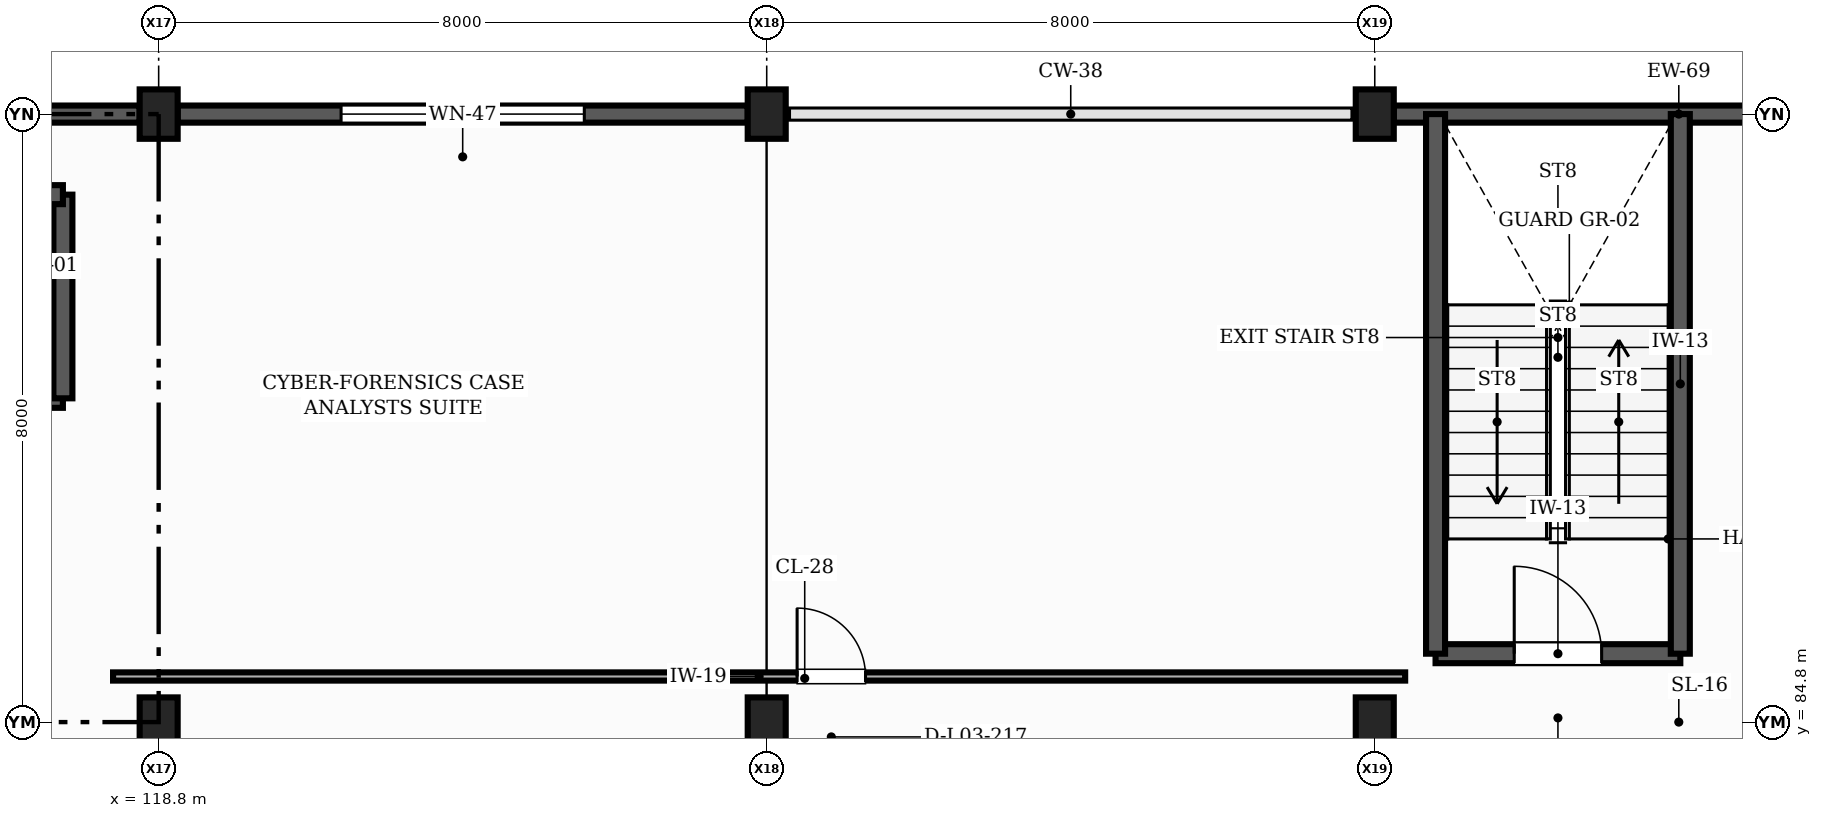
"""IFC4 building model, lengths in metres.
Left out: names, types, materials, properties, quantities, classifications, styles, units other than length and angle.
Written with IfcOpenShell. Run it as: python <this file> out.ifc"""

import sys

from ifc_helpers import new_model, si_unit, direction, frame, frame_2d, origin, origin_2d, place, context, subcontext, project, spatial, rectangle, extrude, element, fill, save


model = new_model("IFC4")
c1 = context("Model", 3, precision=1e-05, world=origin(), true_north=direction((0.0, 1.0)))
c2 = subcontext(c1, "Body", "Model", "MODEL_VIEW")
j1 = project(units=[si_unit("LENGTHUNIT", "METRE"), si_unit("PLANEANGLEUNIT", "RADIAN")], contexts=[c1])
p1 = place(None, origin())
s1 = spatial("IfcSite", under=j1, at=p1, CompositionType="ELEMENT")
p2 = place(p1, origin())
s2 = spatial("IfcBuilding", under=s1, at=p2, CompositionType="ELEMENT")
p3 = place(p2, frame((0.0, 0.0, 13.5)))
s3 = spatial("IfcBuildingStorey", under=s2, at=p3, CompositionType="ELEMENT", Elevation=13.5)
for number, where, z_axis, x_axis in (
    (1, (118.8, 84.8, 0.0), (0.0, 0.0, 1.0), (1.0, 0.0, 0.0)),
    (2, (118.8, 92.8, 0.0), (0.0, 0.0, 1.0), (1.0, 0.0, 0.0)),
    (3, (126.8, 84.8, 0.0), (0.0, 0.0, 1.0), (1.0, 0.0, 0.0)),
    (4, (126.8, 92.8, 0.0), (0.0, 0.0, 1.0), (1.0, 0.0, 0.0)),
    (5, (134.8, 84.8, 0.0), (0.0, 0.0, 1.0), (1.0, 0.0, 0.0)),
    (6, (134.8, 92.8, 0.0), (0.0, 0.0, 1.0), (1.0, 0.0, 0.0)),
):
    element("IfcColumn", number, at=place(p3, frame(where, z_axis=z_axis, x_axis=x_axis)), inside=s3, PredefinedType="COLUMN", context=c2, shape_type="SweptSolid", body=[
        extrude(rectangle(XDim=0.5, YDim=0.65, at=origin_2d()), origin(), (0.0, 0.0, 1.0), 4.5),
    ])
p4 = place(p3, frame((142.55, 92.8, 0.0), z_axis=(0.0, 0.0, 1.0), x_axis=(-1.0, 0.0, 0.0)))
e7 = element("IfcWall", 7, at=p4, inside=s3, PredefinedType="SOLIDWALL", context=c2, shape_type="SweptSolid", body=[
    extrude(rectangle(XDim=7.5, YDim=0.225, at=frame_2d((3.75, 0.0))), origin(), (0.0, 0.0, 1.0), 4.19),
])
p5 = place(p3, frame((126.55, 92.8, 0.0), z_axis=(0.0, 0.0, 1.0), x_axis=(-1.0, 0.0, 0.0)))
e8 = element("IfcWall", 8, at=p5, inside=s3, PredefinedType="SOLIDWALL", context=c2, shape_type="SweptSolid", body=[
    extrude(rectangle(XDim=7.5, YDim=0.225, at=frame_2d((3.75, 0.0))), origin(), (0.0, 0.0, 1.0), 3.54),
])
p6 = place(p5, frame((2.15, 0.0, 0.9)))
e9 = element("IfcOpeningElement", 9, at=p6, cuts=e8, PredefinedType="OPENING", context=c2, shape_type="SweptSolid", body=[
    extrude(rectangle(XDim=3.2, YDim=1.6, at=frame_2d((1.6, 0.8))), frame((0.0, 0.123, 0.0), z_axis=(0.0, -1.0, 0.0), x_axis=(1.0, 0.0, 0.0)), (0.0, 0.0, 1.0), 0.245),
])
p7 = place(p3, frame((118.55, 92.8, 0.0), z_axis=(0.0, 0.0, 1.0), x_axis=(-1.0, 0.0, 0.0)))
e10 = element("IfcWall", 10, at=p7, inside=s3, PredefinedType="SOLIDWALL", context=c2, shape_type="SweptSolid", body=[
    extrude(rectangle(XDim=7.5, YDim=0.225, at=frame_2d((3.75, 0.0))), origin(), (0.0, 0.0, 1.0), 4.19),
])
p8 = place(p3, frame((115.46, 89.06, 0.0), z_axis=(0.0, 0.0, 1.0), x_axis=(1.0, 0.0, 0.0)))
e11 = element("IfcWall", 11, at=p8, inside=s3, PredefinedType="SHEAR", context=c2, shape_type="SweptSolid", body=[
    extrude(rectangle(XDim=2.08, YDim=0.25, at=frame_2d((1.04, 0.0))), origin(), (0.0, 0.0, 1.0), 4.5),
])
p9 = place(p8, frame((0.39, 0.0, 0.0)))
e12 = element("IfcOpeningElement", 12, at=p9, cuts=e11, PredefinedType="OPENING", context=c2, shape_type="SweptSolid", body=[
    extrude(rectangle(XDim=1.3, YDim=2.25, at=frame_2d((0.65, 1.125))), frame((0.0, 0.135, 0.0), z_axis=(0.0, -1.0, 0.0), x_axis=(1.0, 0.0, 0.0)), (0.0, 0.0, 1.0), 0.27),
])
p10 = place(p3, frame((117.54, 89.06, 0.0), z_axis=(0.0, 0.0, 1.0), x_axis=(0.0, 1.0, 0.0)))
e13 = element("IfcWall", 13, at=p10, inside=s3, PredefinedType="SHEAR", context=c2, shape_type="SweptSolid", body=[
    extrude(rectangle(XDim=2.68, YDim=0.25, at=frame_2d((1.34, 0.0))), origin(), (0.0, 0.0, 1.0), 4.5),
])
p11 = place(p3, frame((117.54, 91.74, 0.0), z_axis=(0.0, 0.0, 1.0), x_axis=(-1.0, 0.0, 0.0)))
e14 = element("IfcWall", 14, at=p11, inside=s3, PredefinedType="SHEAR", context=c2, shape_type="SweptSolid", body=[
    extrude(rectangle(XDim=2.08, YDim=0.25, at=frame_2d((1.04, 0.0))), origin(), (0.0, 0.0, 1.0), 4.5),
])
p12 = place(p3, frame((135.6, 85.7, 0.0), z_axis=(0.0, 0.0, 1.0), x_axis=(1.0, 0.0, 0.0)))
e15 = element("IfcWall", 15, at=p12, inside=s3, PredefinedType="SHEAR", context=c2, shape_type="SweptSolid", body=[
    extrude(rectangle(XDim=3.22, YDim=0.25, at=frame_2d((1.61, 0.0))), origin(), (0.0, 0.0, 1.0), 4.5),
])
p13 = place(p12, frame((1.035, 0.0, 0.0)))
e16 = element("IfcOpeningElement", 16, at=p13, cuts=e15, PredefinedType="OPENING", context=c2, shape_type="SweptSolid", body=[
    extrude(rectangle(XDim=1.15, YDim=2.15, at=frame_2d((0.575, 1.075))), frame((0.0, 0.135, 0.0), z_axis=(0.0, -1.0, 0.0), x_axis=(1.0, 0.0, 0.0)), (0.0, 0.0, 1.0), 0.27),
])
for number, where, z_axis, x_axis in (
    (17, (138.82, 85.7, 0.0), (0.0, 0.0, 1.0), (0.0, 1.0, 0.0)),
    (18, (135.6, 92.8, 0.0), (0.0, 0.0, 1.0), (0.0, -1.0, 0.0)),
):
    element("IfcWall", number, at=place(p3, frame(where, z_axis=z_axis, x_axis=x_axis)), inside=s3, PredefinedType="SHEAR", context=c2, shape_type="SweptSolid", body=[
        extrude(rectangle(XDim=7.1, YDim=0.25, at=frame_2d((3.55, 0.0))), origin(), (0.0, 0.0, 1.0), 4.5),
    ])
p14 = place(p3, frame((118.2, 85.4, 0.0), z_axis=(0.0, 0.0, 1.0), x_axis=(1.0, 0.0, 0.0)))
e19 = element("IfcWall", 19, at=p14, inside=s3, PredefinedType="PARTITIONING", context=c2, shape_type="SweptSolid", body=[
    extrude(rectangle(XDim=17.0, YDim=0.108, at=frame_2d((8.5, 0.0))), origin(), (0.0, 0.0, 1.0), 3.625),
])
p15 = place(p14, frame((9.0, 0.0, 0.0)))
e20 = element("IfcOpeningElement", 20, at=p15, cuts=e19, PredefinedType="OPENING", context=c2, shape_type="SweptSolid", body=[
    extrude(rectangle(XDim=0.9, YDim=2.1, at=frame_2d((0.45, 1.05))), frame((0.0, 0.064, 0.0), z_axis=(0.0, -1.0, 0.0), x_axis=(1.0, 0.0, 0.0)), (0.0, 0.0, 1.0), 0.128),
])
p16 = place(p6, origin())
e21 = element("IfcWindow", 21, at=p16, inside=s3, PartitioningType="SINGLE_PANEL", PredefinedType="WINDOW", context=c2, shape_type="SweptSolid", body=[
    extrude(rectangle(XDim=3.2, YDim=1.6, at=frame_2d((1.6, 0.8))), frame((0.0, 0.03, 0.0), z_axis=(0.0, -1.0, 0.0), x_axis=(1.0, 0.0, 0.0)), (0.0, 0.0, 1.0), 0.06),
])
fill(e9, e21)
p17 = place(p13, origin())
e22 = element("IfcDoor", 22, at=p17, inside=s3, OperationType="SINGLE_SWING_LEFT", PredefinedType="DOOR", context=c2, shape_type="SweptSolid", body=[
    extrude(rectangle(XDim=1.15, YDim=2.15, at=frame_2d((0.575, 1.075))), frame((0.0, 0.025, 0.0), z_axis=(0.0, -1.0, 0.0), x_axis=(1.0, 0.0, 0.0)), (0.0, 0.0, 1.0), 0.05),
])
fill(e16, e22)
p18 = place(p15, origin())
e23 = element("IfcDoor", 23, at=p18, inside=s3, OperationType="SINGLE_SWING_LEFT", PredefinedType="DOOR", context=c2, shape_type="SweptSolid", body=[
    extrude(rectangle(XDim=0.9, YDim=2.1, at=frame_2d((0.45, 1.05))), frame((0.0, 0.025, 0.0), z_axis=(0.0, -1.0, 0.0), x_axis=(1.0, 0.0, 0.0)), (0.0, 0.0, 1.0), 0.05),
])
fill(e20, e23)
save(model, sys.argv[1])
